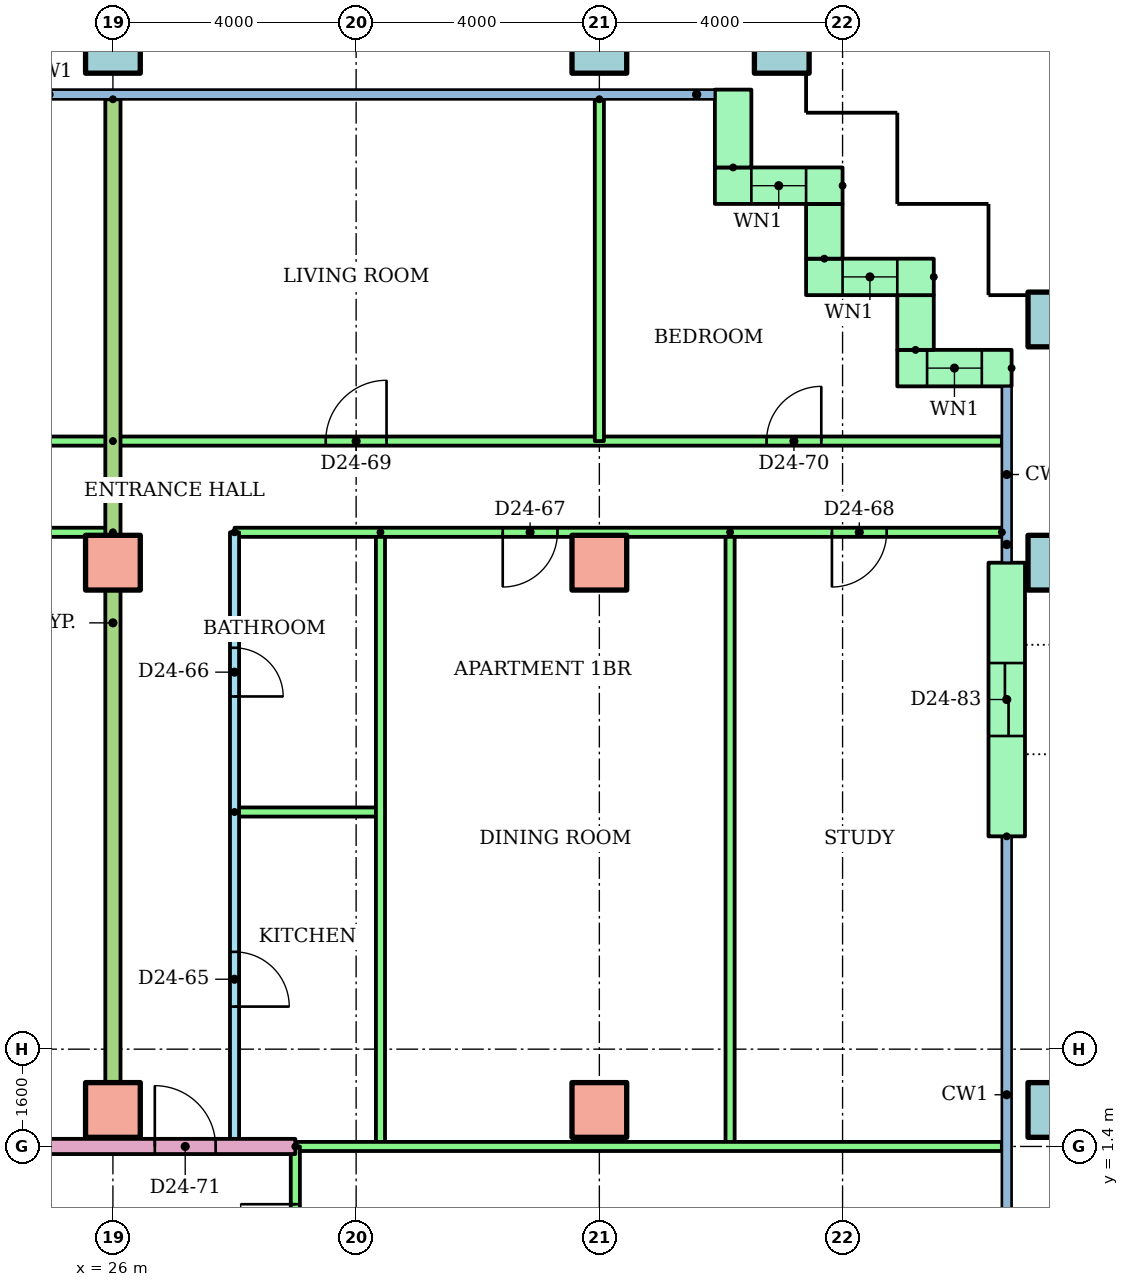
"""IFC4 building model, lengths in metres.
Left out: names, types, materials, properties, quantities, classifications, styles, units other than length and angle.
Written with IfcOpenShell. Run it as: python <this file> out.ifc"""

import sys

from ifc_helpers import new_model, si_unit, direction, frame, frame_2d, origin, origin_2d, place, context, subcontext, project, spatial, rectangle, hollow_rectangle, extrude, element, fill, save


model = new_model("IFC4")
c1 = context("Model", 3, precision=1e-05, world=origin(), true_north=direction((0.0, 1.0)))
c2 = subcontext(c1, "Body", "Model", "MODEL_VIEW")
j1 = project(units=[si_unit("LENGTHUNIT", "METRE"), si_unit("PLANEANGLEUNIT", "RADIAN")], contexts=[c1])
p1 = place(None, origin())
s1 = spatial("IfcSite", under=j1, at=p1, CompositionType="ELEMENT")
p2 = place(p1, origin())
s2 = spatial("IfcBuilding", under=s1, at=p2, CompositionType="ELEMENT")
p3 = place(p2, frame((0.0, 0.0, 93.5)))
s3 = spatial("IfcBuildingStorey", under=s2, at=p3, CompositionType="ELEMENT", Elevation=93.5)
for number, where in (
    (1, (26.0, 2.0, 0.0)),
    (2, (34.0, 2.0, 0.0)),
):
    element("IfcColumn", number, at=place(p3, frame(where)), inside=s3, PredefinedType="COLUMN", context=c2, shape_type="SweptSolid", body=[
        extrude(rectangle(XDim=0.9, YDim=0.9, at=origin_2d()), origin(), (0.0, 0.0, 1.0), 3.2),
    ])
p4 = place(p3, frame((41.5, 2.0, 0.0)))
e3 = element("IfcColumn", 3, at=p4, inside=s3, PredefinedType="COLUMN", context=c2, shape_type="SweptSolid", body=[
    extrude(hollow_rectangle(XDim=0.9, YDim=0.9, WallThickness=0.045, at=origin_2d()), origin(), (0.0, 0.0, 1.0), 3.2),
])
for number, where in (
    (4, (26.0, 11.0, 0.0)),
    (5, (34.0, 11.0, 0.0)),
):
    element("IfcColumn", number, at=place(p3, frame(where)), inside=s3, PredefinedType="COLUMN", context=c2, shape_type="SweptSolid", body=[
        extrude(rectangle(XDim=0.9, YDim=0.9, at=origin_2d()), origin(), (0.0, 0.0, 1.0), 3.2),
    ])
for number, where in (
    (6, (41.5, 11.0, 0.0)),
    (7, (41.5, 15.0, 0.0)),
    (8, (26.0, 19.5, 0.0)),
    (9, (34.0, 19.5, 0.0)),
    (10, (37.0, 19.5, 0.0)),
):
    element("IfcColumn", number, at=place(p3, frame(where)), inside=s3, PredefinedType="COLUMN", context=c2, shape_type="SweptSolid", body=[
        extrude(hollow_rectangle(XDim=0.9, YDim=0.9, WallThickness=0.045, at=origin_2d()), origin(), (0.0, 0.0, 1.0), 3.2),
    ])
p5 = place(p3, frame((40.78, 14.2, 0.0), z_axis=(0.0, 0.0, 1.0), x_axis=(-1.0, 0.0, 0.0)))
e11 = element("IfcWall", 11, at=p5, inside=s3, PredefinedType="STANDARD", context=c2, shape_type="SweptSolid", body=[
    extrude(rectangle(XDim=1.88, YDim=0.6, at=frame_2d((0.94, 0.0))), origin(), (0.0, 0.0, 1.0), 2.92),
])
p6 = place(p5, frame((0.49, 0.0, 0.9)))
e12 = element("IfcOpeningElement", 12, at=p6, cuts=e11, PredefinedType="OPENING", context=c2, shape_type="SweptSolid", body=[
    extrude(rectangle(XDim=0.9, YDim=1.5, at=frame_2d((0.45, 0.75))), frame((0.0, 0.31, 0.0), z_axis=(0.0, -1.0, 0.0), x_axis=(1.0, 0.0, 0.0)), (0.0, 0.0, 1.0), 0.62),
])
p7 = place(p3, frame((39.2, 14.5, 0.0), z_axis=(0.0, 0.0, 1.0), x_axis=(0.0, 1.0, 0.0)))
e13 = element("IfcWall", 13, at=p7, inside=s3, PredefinedType="STANDARD", context=c2, shape_type="SweptSolid", body=[
    extrude(rectangle(XDim=0.9, YDim=0.6, at=frame_2d((0.45, 0.0))), origin(), (0.0, 0.0, 1.0), 2.92),
])
p8 = place(p3, frame((39.5, 15.7, 0.0), z_axis=(0.0, 0.0, 1.0), x_axis=(-1.0, 0.0, 0.0)))
e14 = element("IfcWall", 14, at=p8, inside=s3, PredefinedType="STANDARD", context=c2, shape_type="SweptSolid", body=[
    extrude(rectangle(XDim=2.1, YDim=0.6, at=frame_2d((1.05, 0.0))), origin(), (0.0, 0.0, 1.0), 2.92),
])
p9 = place(p8, frame((0.6, 0.0, 0.9)))
e15 = element("IfcOpeningElement", 15, at=p9, cuts=e14, PredefinedType="OPENING", context=c2, shape_type="SweptSolid", body=[
    extrude(rectangle(XDim=0.9, YDim=1.5, at=frame_2d((0.45, 0.75))), frame((0.0, 0.31, 0.0), z_axis=(0.0, -1.0, 0.0), x_axis=(1.0, 0.0, 0.0)), (0.0, 0.0, 1.0), 0.62),
])
p10 = place(p3, frame((37.7, 16.0, 0.0), z_axis=(0.0, 0.0, 1.0), x_axis=(0.0, 1.0, 0.0)))
e16 = element("IfcWall", 16, at=p10, inside=s3, PredefinedType="STANDARD", context=c2, shape_type="SweptSolid", body=[
    extrude(rectangle(XDim=0.9, YDim=0.6, at=frame_2d((0.45, 0.0))), origin(), (0.0, 0.0, 1.0), 2.92),
])
p11 = place(p3, frame((38.0, 17.2, 0.0), z_axis=(0.0, 0.0, 1.0), x_axis=(-1.0, 0.0, 0.0)))
e17 = element("IfcWall", 17, at=p11, inside=s3, PredefinedType="STANDARD", context=c2, shape_type="SweptSolid", body=[
    extrude(rectangle(XDim=2.1, YDim=0.6, at=frame_2d((1.05, 0.0))), origin(), (0.0, 0.0, 1.0), 2.92),
])
p12 = place(p11, frame((0.6, 0.0, 0.9)))
e18 = element("IfcOpeningElement", 18, at=p12, cuts=e17, PredefinedType="OPENING", context=c2, shape_type="SweptSolid", body=[
    extrude(rectangle(XDim=0.9, YDim=1.5, at=frame_2d((0.45, 0.75))), frame((0.0, 0.31, 0.0), z_axis=(0.0, -1.0, 0.0), x_axis=(1.0, 0.0, 0.0)), (0.0, 0.0, 1.0), 0.62),
])
p13 = place(p3, frame((36.2, 17.5, 0.0), z_axis=(0.0, 0.0, 1.0), x_axis=(0.0, 1.0, 0.0)))
e19 = element("IfcWall", 19, at=p13, inside=s3, PredefinedType="STANDARD", context=c2, shape_type="SweptSolid", body=[
    extrude(rectangle(XDim=1.28, YDim=0.6, at=frame_2d((0.64, 0.0))), origin(), (0.0, 0.0, 1.0), 2.92),
])
p14 = place(p3, frame((40.7, 6.5, 0.0), z_axis=(0.0, 0.0, 1.0), x_axis=(0.0, 1.0, 0.0)))
e20 = element("IfcWall", 20, at=p14, inside=s3, PredefinedType="STANDARD", context=c2, shape_type="SweptSolid", body=[
    extrude(rectangle(XDim=4.5, YDim=0.6, at=frame_2d((2.25, 0.0))), origin(), (0.0, 0.0, 1.0), 2.92),
])
p15 = place(p14, frame((1.65, 0.0, 0.0)))
e21 = element("IfcOpeningElement", 21, at=p15, cuts=e20, PredefinedType="OPENING", context=c2, shape_type="SweptSolid", body=[
    extrude(rectangle(XDim=1.2, YDim=2.1, at=frame_2d((0.6, 1.05))), frame((0.0, 0.31, 0.0), z_axis=(0.0, -1.0, 0.0), x_axis=(1.0, 0.0, 0.0)), (0.0, 0.0, 1.0), 0.62),
])
p16 = place(p3, frame((26.0, 11.5, 0.0), z_axis=(0.0, 0.0, 1.0), x_axis=(-1.0, 0.0, 0.0)))
e22 = element("IfcWall", 22, at=p16, inside=s3, PredefinedType="PARTITIONING", context=c2, shape_type="SweptSolid", body=[
    extrude(rectangle(XDim=10.0, YDim=0.15, at=frame_2d((5.0, 0.0))), origin(), (0.0, 0.0, 1.0), 2.4),
])
p17 = place(p16, frame((5.525, 0.0, 0.0)))
e23 = element("IfcOpeningElement", 23, at=p17, cuts=e22, PredefinedType="OPENING", context=c2, shape_type="SweptSolid", body=[
    extrude(rectangle(XDim=0.9, YDim=2.1, at=frame_2d((0.45, 1.05))), frame((0.0, 0.085, 0.0), z_axis=(0.0, -1.0, 0.0), x_axis=(1.0, 0.0, 0.0)), (0.0, 0.0, 1.0), 0.17),
])
p18 = place(p16, frame((1.725, 0.0, 0.0)))
e24 = element("IfcOpeningElement", 24, at=p18, cuts=e22, PredefinedType="OPENING", context=c2, shape_type="SweptSolid", body=[
    extrude(rectangle(XDim=0.9, YDim=2.1, at=frame_2d((0.45, 1.05))), frame((0.0, 0.085, 0.0), z_axis=(0.0, -1.0, 0.0), x_axis=(1.0, 0.0, 0.0)), (0.0, 0.0, 1.0), 0.17),
])
p19 = place(p3, frame((14.0, 13.0, 0.0)))
e25 = element("IfcWall", 25, at=p19, inside=s3, PredefinedType="PARTITIONING", context=c2, shape_type="SweptSolid", body=[
    extrude(rectangle(XDim=12.0, YDim=0.15, at=frame_2d((6.0, 0.0))), origin(), (0.0, 0.0, 1.0), 2.4),
])
p20 = place(p19, frame((1.5, 0.0, 0.0)))
e26 = element("IfcOpeningElement", 26, at=p20, cuts=e25, PredefinedType="OPENING", context=c2, shape_type="SweptSolid", body=[
    extrude(rectangle(XDim=1.0, YDim=2.1, at=frame_2d((0.5, 1.05))), frame((0.0, 0.085, 0.0), z_axis=(0.0, -1.0, 0.0), x_axis=(1.0, 0.0, 0.0)), (0.0, 0.0, 1.0), 0.17),
])
p21 = place(p19, frame((7.5, 0.0, 0.0)))
e27 = element("IfcOpeningElement", 27, at=p21, cuts=e25, PredefinedType="OPENING", context=c2, shape_type="SweptSolid", body=[
    extrude(rectangle(XDim=1.0, YDim=2.1, at=frame_2d((0.5, 1.05))), frame((0.0, 0.085, 0.0), z_axis=(0.0, -1.0, 0.0), x_axis=(1.0, 0.0, 0.0)), (0.0, 0.0, 1.0), 0.17),
])
p22 = place(p3, frame((28.0, 11.5, 0.0), z_axis=(0.0, 0.0, 1.0), x_axis=(0.0, -1.0, 0.0)))
e28 = element("IfcWall", 28, at=p22, inside=s3, PredefinedType="PARTITIONING", context=c2, shape_type="SweptSolid", body=[
    extrude(rectangle(XDim=10.1, YDim=0.15, at=frame_2d((5.05, 0.0))), origin(), (0.0, 0.0, 1.0), 2.4),
])
p23 = place(p22, frame((6.9, 0.0, 0.0)))
e29 = element("IfcOpeningElement", 29, at=p23, cuts=e28, PredefinedType="OPENING", context=c2, shape_type="SweptSolid", body=[
    extrude(rectangle(XDim=0.9, YDim=2.1, at=frame_2d((0.45, 1.05))), frame((0.0, 0.085, 0.0), z_axis=(0.0, -1.0, 0.0), x_axis=(1.0, 0.0, 0.0)), (0.0, 0.0, 1.0), 0.17),
])
p24 = place(p22, frame((1.9, 0.0, 0.0)))
e30 = element("IfcOpeningElement", 30, at=p24, cuts=e28, PredefinedType="OPENING", context=c2, shape_type="SweptSolid", body=[
    extrude(rectangle(XDim=0.8, YDim=2.1, at=frame_2d((0.4, 1.05))), frame((0.0, 0.085, 0.0), z_axis=(0.0, -1.0, 0.0), x_axis=(1.0, 0.0, 0.0)), (0.0, 0.0, 1.0), 0.17),
])
p25 = place(p3, frame((28.0, 6.9, 0.0)))
e31 = element("IfcWall", 31, at=p25, inside=s3, PredefinedType="PARTITIONING", context=c2, shape_type="SweptSolid", body=[
    extrude(rectangle(XDim=2.4, YDim=0.15, at=frame_2d((1.2, 0.0))), origin(), (0.0, 0.0, 1.0), 2.4),
])
for number, where, z_axis, x_axis in (
    (32, (30.4, 11.5, 0.0), (0.0, 0.0, 1.0), (0.0, -1.0, 0.0)),
    (33, (36.15, 11.5, 0.0), (0.0, 0.0, 1.0), (0.0, -1.0, 0.0)),
):
    element("IfcWall", number, at=place(p3, frame(where, z_axis=z_axis, x_axis=x_axis)), inside=s3, PredefinedType="PARTITIONING", context=c2, shape_type="SweptSolid", body=[
        extrude(rectangle(XDim=10.1, YDim=0.15, at=frame_2d((5.05, 0.0))), origin(), (0.0, 0.0, 1.0), 2.4),
    ])
p26 = place(p3, frame((40.62, 11.5, 0.0), z_axis=(0.0, 0.0, 1.0), x_axis=(-1.0, 0.0, 0.0)))
e34 = element("IfcWall", 34, at=p26, inside=s3, PredefinedType="PARTITIONING", context=c2, shape_type="SweptSolid", body=[
    extrude(rectangle(XDim=12.62, YDim=0.15, at=frame_2d((6.31, 0.0))), origin(), (0.0, 0.0, 1.0), 2.4),
])
p27 = place(p26, frame((7.309, 0.0, 0.0)))
e35 = element("IfcOpeningElement", 35, at=p27, cuts=e34, PredefinedType="OPENING", context=c2, shape_type="SweptSolid", body=[
    extrude(rectangle(XDim=0.9, YDim=2.1, at=frame_2d((0.45, 1.05))), frame((0.0, 0.085, 0.0), z_axis=(0.0, -1.0, 0.0), x_axis=(1.0, 0.0, 0.0)), (0.0, 0.0, 1.0), 0.17),
])
p28 = place(p26, frame((1.895, 0.0, 0.0)))
e36 = element("IfcOpeningElement", 36, at=p28, cuts=e34, PredefinedType="OPENING", context=c2, shape_type="SweptSolid", body=[
    extrude(rectangle(XDim=0.9, YDim=2.1, at=frame_2d((0.45, 1.05))), frame((0.0, 0.085, 0.0), z_axis=(0.0, -1.0, 0.0), x_axis=(1.0, 0.0, 0.0)), (0.0, 0.0, 1.0), 0.17),
])
p29 = place(p3, frame((26.0, 13.0, 0.0)))
e37 = element("IfcWall", 37, at=p29, inside=s3, PredefinedType="PARTITIONING", context=c2, shape_type="SweptSolid", body=[
    extrude(rectangle(XDim=14.62, YDim=0.15, at=frame_2d((7.31, 0.0))), origin(), (0.0, 0.0, 1.0), 2.4),
])
p30 = place(p29, frame((3.5, 0.0, 0.0)))
e38 = element("IfcOpeningElement", 38, at=p30, cuts=e37, PredefinedType="OPENING", context=c2, shape_type="SweptSolid", body=[
    extrude(rectangle(XDim=1.0, YDim=2.1, at=frame_2d((0.5, 1.05))), frame((0.0, 0.085, 0.0), z_axis=(0.0, -1.0, 0.0), x_axis=(1.0, 0.0, 0.0)), (0.0, 0.0, 1.0), 0.17),
])
p31 = place(p29, frame((10.75, 0.0, 0.0)))
e39 = element("IfcOpeningElement", 39, at=p31, cuts=e37, PredefinedType="OPENING", context=c2, shape_type="SweptSolid", body=[
    extrude(rectangle(XDim=0.9, YDim=2.1, at=frame_2d((0.45, 1.05))), frame((0.0, 0.085, 0.0), z_axis=(0.0, -1.0, 0.0), x_axis=(1.0, 0.0, 0.0)), (0.0, 0.0, 1.0), 0.17),
])
p32 = place(p3, frame((34.0, 18.621, 0.0), z_axis=(0.0, 0.0, 1.0), x_axis=(0.0, -1.0, 0.0)))
e40 = element("IfcWall", 40, at=p32, inside=s3, PredefinedType="PARTITIONING", context=c2, shape_type="SweptSolid", body=[
    extrude(rectangle(XDim=5.621, YDim=0.15, at=frame_2d((2.811, 0.0))), origin(), (0.0, 0.0, 1.0), 2.4),
])
p33 = place(p3, frame((26.0, 18.621, 0.0), z_axis=(0.0, 0.0, 1.0), x_axis=(0.0, -1.0, 0.0)))
e41 = element("IfcWall", 41, at=p33, inside=s3, PredefinedType="PARTITIONING", context=c2, shape_type="SweptSolid", body=[
    extrude(rectangle(XDim=17.221, YDim=0.25, at=frame_2d((8.611, 0.0))), origin(), (0.0, 0.0, 1.0), 2.4),
])
p34 = place(p3, frame((14.0, 1.4, 0.0)))
e42 = element("IfcWall", 42, at=p34, inside=s3, PredefinedType="PARTITIONING", context=c2, shape_type="SweptSolid", body=[
    extrude(rectangle(XDim=15.0, YDim=0.25, at=frame_2d((7.5, 0.0))), origin(), (0.0, 0.0, 1.0), 2.4),
])
p35 = place(p34, frame((0.5, 0.0, 0.0)))
e43 = element("IfcOpeningElement", 43, at=p35, cuts=e42, PredefinedType="OPENING", context=c2, shape_type="SweptSolid", body=[
    extrude(rectangle(XDim=1.0, YDim=2.1, at=frame_2d((0.5, 1.05))), frame((0.0, 0.135, 0.0), z_axis=(0.0, -1.0, 0.0), x_axis=(1.0, 0.0, 0.0)), (0.0, 0.0, 1.0), 0.27),
])
p36 = place(p34, frame((12.689, 0.0, 0.0)))
e44 = element("IfcOpeningElement", 44, at=p36, cuts=e42, PredefinedType="OPENING", context=c2, shape_type="SweptSolid", body=[
    extrude(rectangle(XDim=1.0, YDim=2.1, at=frame_2d((0.5, 1.05))), frame((0.0, 0.135, 0.0), z_axis=(0.0, -1.0, 0.0), x_axis=(1.0, 0.0, 0.0)), (0.0, 0.0, 1.0), 0.27),
])
p37 = place(p3, frame((29.0, 1.4, 0.0)))
e45 = element("IfcWall", 45, at=p37, inside=s3, PredefinedType="PARTITIONING", context=c2, shape_type="SweptSolid", body=[
    extrude(rectangle(XDim=11.62, YDim=0.15, at=frame_2d((5.81, 0.0))), origin(), (0.0, 0.0, 1.0), 2.4),
])
p38 = place(p3, frame((29.0, -1.4, 0.0), z_axis=(0.0, 0.0, 1.0), x_axis=(0.0, 1.0, 0.0)))
e46 = element("IfcWall", 46, at=p38, inside=s3, PredefinedType="PARTITIONING", context=c2, shape_type="SweptSolid", body=[
    extrude(rectangle(XDim=2.8, YDim=0.15, at=frame_2d((1.4, 0.0))), origin(), (0.0, 0.0, 1.0), 2.4),
])
p39 = place(p38, frame((0.95, 0.0, 0.0)))
e47 = element("IfcOpeningElement", 47, at=p39, cuts=e46, PredefinedType="OPENING", context=c2, shape_type="SweptSolid", body=[
    extrude(rectangle(XDim=0.9, YDim=2.1, at=frame_2d((0.45, 1.05))), frame((0.0, 0.085, 0.0), z_axis=(0.0, -1.0, 0.0), x_axis=(1.0, 0.0, 0.0)), (0.0, 0.0, 1.0), 0.17),
])
p40 = place(p6, origin())
e48 = element("IfcWindow", 48, at=p40, inside=s3, PartitioningType="SINGLE_PANEL", PredefinedType="WINDOW", context=c2, shape_type="SweptSolid", body=[
    extrude(rectangle(XDim=0.9, YDim=1.5, at=frame_2d((0.45, 0.75))), frame((0.0, 0.03, 0.0), z_axis=(0.0, -1.0, 0.0), x_axis=(1.0, 0.0, 0.0)), (0.0, 0.0, 1.0), 0.06),
])
fill(e12, e48)
p41 = place(p9, origin())
e49 = element("IfcWindow", 49, at=p41, inside=s3, PartitioningType="SINGLE_PANEL", PredefinedType="WINDOW", context=c2, shape_type="SweptSolid", body=[
    extrude(rectangle(XDim=0.9, YDim=1.5, at=frame_2d((0.45, 0.75))), frame((0.0, 0.03, 0.0), z_axis=(0.0, -1.0, 0.0), x_axis=(1.0, 0.0, 0.0)), (0.0, 0.0, 1.0), 0.06),
])
fill(e15, e49)
p42 = place(p12, origin())
e50 = element("IfcWindow", 50, at=p42, inside=s3, PartitioningType="SINGLE_PANEL", PredefinedType="WINDOW", context=c2, shape_type="SweptSolid", body=[
    extrude(rectangle(XDim=0.9, YDim=1.5, at=frame_2d((0.45, 0.75))), frame((0.0, 0.03, 0.0), z_axis=(0.0, -1.0, 0.0), x_axis=(1.0, 0.0, 0.0)), (0.0, 0.0, 1.0), 0.06),
])
fill(e18, e50)
p43 = place(p23, origin())
e51 = element("IfcDoor", 51, at=p43, inside=s3, OperationType="SINGLE_SWING_RIGHT", PredefinedType="DOOR", context=c2, shape_type="SweptSolid", body=[
    extrude(rectangle(XDim=0.9, YDim=2.1, at=frame_2d((0.45, 1.05))), frame((0.0, 0.025, 0.0), z_axis=(0.0, -1.0, 0.0), x_axis=(1.0, 0.0, 0.0)), (0.0, 0.0, 1.0), 0.05),
])
fill(e29, e51)
p44 = place(p24, origin())
e52 = element("IfcDoor", 52, at=p44, inside=s3, OperationType="SINGLE_SWING_RIGHT", PredefinedType="DOOR", context=c2, shape_type="SweptSolid", body=[
    extrude(rectangle(XDim=0.8, YDim=2.1, at=frame_2d((0.4, 1.05))), frame((0.0, 0.025, 0.0), z_axis=(0.0, -1.0, 0.0), x_axis=(1.0, 0.0, 0.0)), (0.0, 0.0, 1.0), 0.05),
])
fill(e30, e52)
p45 = place(p27, origin())
e53 = element("IfcDoor", 53, at=p45, inside=s3, OperationType="SINGLE_SWING_RIGHT", PredefinedType="DOOR", context=c2, shape_type="SweptSolid", body=[
    extrude(rectangle(XDim=0.9, YDim=2.1, at=frame_2d((0.45, 1.05))), frame((0.0, 0.025, 0.0), z_axis=(0.0, -1.0, 0.0), x_axis=(1.0, 0.0, 0.0)), (0.0, 0.0, 1.0), 0.05),
])
fill(e35, e53)
p46 = place(p28, origin())
e54 = element("IfcDoor", 54, at=p46, inside=s3, OperationType="SINGLE_SWING_RIGHT", PredefinedType="DOOR", context=c2, shape_type="SweptSolid", body=[
    extrude(rectangle(XDim=0.9, YDim=2.1, at=frame_2d((0.45, 1.05))), frame((0.0, 0.025, 0.0), z_axis=(0.0, -1.0, 0.0), x_axis=(1.0, 0.0, 0.0)), (0.0, 0.0, 1.0), 0.05),
])
fill(e36, e54)
p47 = place(p30, origin())
e55 = element("IfcDoor", 55, at=p47, inside=s3, OperationType="SINGLE_SWING_RIGHT", PredefinedType="DOOR", context=c2, shape_type="SweptSolid", body=[
    extrude(rectangle(XDim=1.0, YDim=2.1, at=frame_2d((0.5, 1.05))), frame((0.0, 0.025, 0.0), z_axis=(0.0, -1.0, 0.0), x_axis=(1.0, 0.0, 0.0)), (0.0, 0.0, 1.0), 0.05),
])
fill(e38, e55)
p48 = place(p31, origin())
e56 = element("IfcDoor", 56, at=p48, inside=s3, OperationType="SINGLE_SWING_RIGHT", PredefinedType="DOOR", context=c2, shape_type="SweptSolid", body=[
    extrude(rectangle(XDim=0.9, YDim=2.1, at=frame_2d((0.45, 1.05))), frame((0.0, 0.025, 0.0), z_axis=(0.0, -1.0, 0.0), x_axis=(1.0, 0.0, 0.0)), (0.0, 0.0, 1.0), 0.05),
])
fill(e39, e56)
p49 = place(p36, origin())
e57 = element("IfcDoor", 57, at=p49, inside=s3, OperationType="SINGLE_SWING_LEFT", PredefinedType="DOOR", context=c2, shape_type="SweptSolid", body=[
    extrude(rectangle(XDim=1.0, YDim=2.1, at=frame_2d((0.5, 1.05))), frame((0.0, 0.025, 0.0), z_axis=(0.0, -1.0, 0.0), x_axis=(1.0, 0.0, 0.0)), (0.0, 0.0, 1.0), 0.05),
])
fill(e44, e57)
p50 = place(p39, origin())
e58 = element("IfcDoor", 58, at=p50, inside=s3, OperationType="SINGLE_SWING_RIGHT", PredefinedType="DOOR", context=c2, shape_type="SweptSolid", body=[
    extrude(rectangle(XDim=0.9, YDim=2.1, at=frame_2d((0.45, 1.05))), frame((0.0, 0.025, 0.0), z_axis=(0.0, -1.0, 0.0), x_axis=(1.0, 0.0, 0.0)), (0.0, 0.0, 1.0), 0.05),
])
fill(e47, e58)
p51 = place(p15, origin())
e59 = element("IfcDoor", 59, at=p51, inside=s3, OperationType="SLIDING_TO_LEFT", PredefinedType="DOOR", context=c2, shape_type="SweptSolid", body=[
    extrude(rectangle(XDim=1.2, YDim=2.1, at=frame_2d((0.6, 1.05))), frame((0.0, 0.025, 0.0), z_axis=(0.0, -1.0, 0.0), x_axis=(1.0, 0.0, 0.0)), (0.0, 0.0, 1.0), 0.05),
])
fill(e21, e59)
save(model, sys.argv[1])
